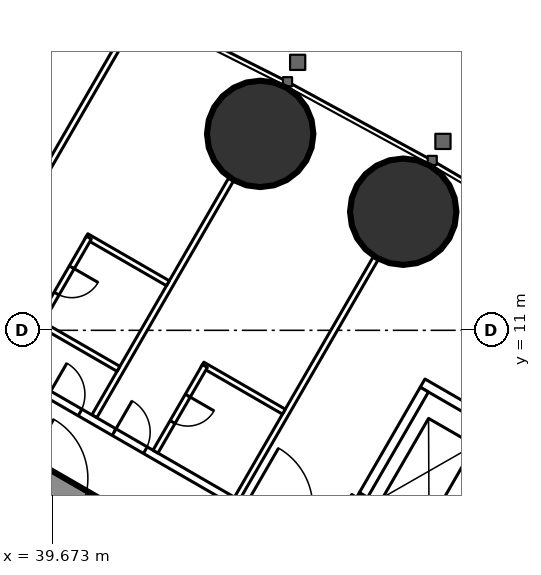
"""IFC4 building model, lengths in metres.
Left out: names, types, materials, properties, quantities, classifications, styles, units other than length and angle.
Written with IfcOpenShell. Run it as: python <this file> out.ifc"""

import sys

from ifc_helpers import new_model, si_unit, direction, frame, frame_2d, origin, origin_2d, place, context, subcontext, project, spatial, rectangle, circle, extrude, element, fill, save


model = new_model("IFC4")
c1 = context("Model", 3, precision=1e-05, world=origin(), true_north=direction((0.0, 1.0)))
c2 = subcontext(c1, "Body", "Model", "MODEL_VIEW")
j1 = project(units=[si_unit("LENGTHUNIT", "METRE"), si_unit("PLANEANGLEUNIT", "RADIAN")], contexts=[c1])
p1 = place(None, origin())
s1 = spatial("IfcSite", under=j1, at=p1, CompositionType="ELEMENT")
p2 = place(p1, origin())
s2 = spatial("IfcBuilding", under=s1, at=p2, CompositionType="ELEMENT")
p3 = place(p2, frame((0.0, 0.0, 159.8)))
s3 = spatial("IfcBuildingStorey", under=s2, at=p3, CompositionType="ELEMENT", Elevation=159.8)
for number, where, z_axis, x_axis in (
    (1, (48.897, 14.121, 0.0), (0.0, 0.0, 1.0), (1.0, 0.0, 0.0)),
    (2, (45.134, 16.168, 0.0), (0.0, 0.0, 1.0), (1.0, 0.0, 0.0)),
):
    element("IfcColumn", number, at=place(p3, frame(where, z_axis=z_axis, x_axis=x_axis)), inside=s3, PredefinedType="COLUMN", context=c2, shape_type="SweptSolid", body=[
        extrude(circle(Radius=1.4, at=origin_2d()), origin(), (0.0, 0.0, 1.0), 3.5),
    ])
p4 = place(p3, frame((27.2, 13.8, 0.0), z_axis=(0.0, 0.0, 1.0), x_axis=(0.866024515034, -0.500001539357, 0.0)))
e3 = element("IfcWall", 3, at=p4, inside=s3, PredefinedType="SHEAR", context=c2, shape_type="SweptSolid", body=[
    extrude(rectangle(XDim=26.907, YDim=1.2, at=frame_2d((13.454, 0.0))), origin(), (0.0, 0.0, 1.0), 3.5),
])
p5 = place(p4, frame((4.6, 0.0, 0.0)))
e4 = element("IfcOpeningElement", 4, at=p5, cuts=e3, PredefinedType="OPENING", context=c2, shape_type="SweptSolid", body=[
    extrude(rectangle(XDim=1.0, YDim=2.2, at=frame_2d((0.5, 1.1))), frame((0.0, 0.61, 0.0), z_axis=(0.0, -1.0, 0.0), x_axis=(1.0, 0.0, 0.0)), (0.0, 0.0, 1.0), 1.22),
])
p6 = place(p4, frame((13.395, 0.0, 0.0)))
e5 = element("IfcOpeningElement", 5, at=p6, cuts=e3, PredefinedType="OPENING", context=c2, shape_type="SweptSolid", body=[
    extrude(rectangle(XDim=1.8, YDim=2.2, at=frame_2d((0.9, 1.1))), frame((0.0, 0.61, 0.0), z_axis=(0.0, -1.0, 0.0), x_axis=(1.0, 0.0, 0.0)), (0.0, 0.0, 1.0), 1.22),
])
p7 = place(p3, frame((37.022, 10.9, 0.0), z_axis=(0.0, 0.0, 1.0), x_axis=(0.499998620953, 0.866026199976, 0.0)))
e6 = element("IfcWall", 6, at=p7, inside=s3, PredefinedType="PARTITIONING", context=c2, shape_type="SweptSolid", body=[
    extrude(rectangle(XDim=9.77, YDim=0.15, at=frame_2d((4.885, 0.0))), origin(), (0.0, 0.0, 1.0), 3.25),
])
p8 = place(p3, frame((40.769, 8.737, 0.0), z_axis=(0.0, 0.0, 1.0), x_axis=(0.500013115284, 0.866017831539, 0.0)))
e7 = element("IfcWall", 7, at=p8, inside=s3, PredefinedType="PARTITIONING", context=c2, shape_type="SweptSolid", body=[
    extrude(rectangle(XDim=7.198, YDim=0.15, at=frame_2d((3.599, 0.0))), origin(), (0.0, 0.0, 1.0), 2.3),
])
p9 = place(p3, frame((44.521, 6.571, 0.0), z_axis=(0.0, 0.0, 1.0), x_axis=(0.500020376429, 0.866013639128, 0.0)))
e8 = element("IfcWall", 8, at=p9, inside=s3, PredefinedType="PARTITIONING", context=c2, shape_type="SweptSolid", body=[
    extrude(rectangle(XDim=7.306, YDim=0.15, at=frame_2d((3.653, 0.0))), origin(), (0.0, 0.0, 1.0), 2.3),
])
p10 = place(p3, frame((36.834, 10.894, 0.0), z_axis=(0.0, 0.0, 1.0), x_axis=(0.866031655879, -0.499989170898, 0.0)))
e9 = element("IfcWall", 9, at=p10, inside=s3, PredefinedType="PARTITIONING", context=c2, shape_type="SweptSolid", body=[
    extrude(rectangle(XDim=11.41, YDim=0.2, at=frame_2d((5.705, 0.0))), origin(), (0.0, 0.0, 1.0), 3.25),
])
p11 = place(p10, frame((5.144, 0.0, 0.0)))
e10 = element("IfcOpeningElement", 10, at=p11, cuts=e9, PredefinedType="OPENING", context=c2, shape_type="SweptSolid", body=[
    extrude(rectangle(XDim=0.95, YDim=2.2, at=frame_2d((0.475, 1.1))), frame((0.0, 0.11, 0.0), z_axis=(0.0, -1.0, 0.0), x_axis=(1.0, 0.0, 0.0)), (0.0, 0.0, 1.0), 0.22),
])
p12 = place(p10, frame((3.161, 0.0, 0.0)))
e11 = element("IfcOpeningElement", 11, at=p12, cuts=e9, PredefinedType="OPENING", context=c2, shape_type="SweptSolid", body=[
    extrude(rectangle(XDim=0.95, YDim=2.2, at=frame_2d((0.475, 1.1))), frame((0.0, 0.11, 0.0), z_axis=(0.0, -1.0, 0.0), x_axis=(1.0, 0.0, 0.0)), (0.0, 0.0, 1.0), 0.22),
])
p13 = place(p10, frame((9.102, 0.0, 0.0)))
e12 = element("IfcOpeningElement", 12, at=p13, cuts=e9, PredefinedType="OPENING", context=c2, shape_type="SweptSolid", body=[
    extrude(rectangle(XDim=1.8, YDim=2.2, at=frame_2d((0.9, 1.1))), frame((0.0, 0.11, 0.0), z_axis=(0.0, -1.0, 0.0), x_axis=(1.0, 0.0, 0.0)), (0.0, 0.0, 1.0), 0.22),
])
p14 = place(p3, frame((47.606, 6.643, 0.0), z_axis=(0.0, 0.0, 1.0), x_axis=(-0.514237157483, -0.857648031458, 0.0)))
e13 = element("IfcWall", 13, at=p14, inside=s3, PredefinedType="PARTITIONING", context=c2, shape_type="SweptSolid", body=[
    extrude(rectangle(XDim=1.805, YDim=0.15, at=frame_2d((0.902, 0.0))), origin(), (0.0, 0.0, 1.0), 3.25),
])
p15 = place(p3, frame((43.613, 10.097, 0.0), z_axis=(0.0, 0.0, 1.0), x_axis=(0.866031185235, -0.4999899861, 0.0)))
e14 = element("IfcWall", 14, at=p15, inside=s3, PredefinedType="PARTITIONING", context=c2, shape_type="SweptSolid", body=[
    extrude(rectangle(XDim=2.475, YDim=0.15, at=frame_2d((1.238, 0.0))), origin(), (0.0, 0.0, 1.0), 3.25),
])
p16 = place(p3, frame((42.378, 7.808, 0.0), z_axis=(0.0, 0.0, 1.0), x_axis=(0.500006934395, 0.866021400173, 0.0)))
e15 = element("IfcWall", 15, at=p16, inside=s3, PredefinedType="PARTITIONING", context=c2, shape_type="SweptSolid", body=[
    extrude(rectangle(XDim=2.6, YDim=0.15, at=frame_2d((1.3, 0.0))), origin(), (0.0, 0.0, 1.0), 3.25),
])
p17 = place(p16, frame((0.9, 0.0, 0.0)))
e16 = element("IfcOpeningElement", 16, at=p17, cuts=e15, PredefinedType="OPENING", context=c2, shape_type="SweptSolid", body=[
    extrude(rectangle(XDim=0.8, YDim=2.2, at=frame_2d((0.4, 1.1))), frame((0.0, 0.085, 0.0), z_axis=(0.0, -1.0, 0.0), x_axis=(1.0, 0.0, 0.0)), (0.0, 0.0, 1.0), 0.17),
])
p18 = place(p3, frame((40.561, 13.476, 0.0), z_axis=(0.0, 0.0, 1.0), x_axis=(0.866006523861, -0.500032699561, 0.0)))
e17 = element("IfcWall", 17, at=p18, inside=s3, PredefinedType="PARTITIONING", context=c2, shape_type="SweptSolid", body=[
    extrude(rectangle(XDim=2.475, YDim=0.15, at=frame_2d((1.237, 0.0))), origin(), (0.0, 0.0, 1.0), 3.25),
])
p19 = place(p3, frame((39.326, 11.187, 0.0), z_axis=(0.0, 0.0, 1.0), x_axis=(0.500047596559, 0.865997922154, 0.0)))
e18 = element("IfcWall", 18, at=p19, inside=s3, PredefinedType="PARTITIONING", context=c2, shape_type="SweptSolid", body=[
    extrude(rectangle(XDim=2.6, YDim=0.15, at=frame_2d((1.3, 0.0))), origin(), (0.0, 0.0, 1.0), 3.25),
])
p20 = place(p19, frame((0.9, 0.0, 0.0)))
e19 = element("IfcOpeningElement", 19, at=p20, cuts=e18, PredefinedType="OPENING", context=c2, shape_type="SweptSolid", body=[
    extrude(rectangle(XDim=0.8, YDim=2.2, at=frame_2d((0.4, 1.1))), frame((0.0, 0.085, 0.0), z_axis=(0.0, -1.0, 0.0), x_axis=(1.0, 0.0, 0.0)), (0.0, 0.0, 1.0), 0.17),
])
p21 = place(p3, frame((39.261, 11.224, 0.0), z_axis=(0.0, 0.0, 1.0), x_axis=(0.866006523861, -0.500032699561, 0.0)))
e20 = element("IfcWall", 20, at=p21, inside=s3, PredefinedType="PARTITIONING", context=c2, shape_type="SweptSolid", body=[
    extrude(rectangle(XDim=2.475, YDim=0.15, at=frame_2d((1.237, 0.0))), origin(), (0.0, 0.0, 1.0), 2.45),
])
p22 = place(p3, frame((47.681, 6.622, 0.0), z_axis=(0.0, 0.0, 1.0), x_axis=(0.86603344179, -0.499986077507, 0.0)))
e21 = element("IfcWall", 21, at=p22, inside=s3, PredefinedType="PARTITIONING", context=c2, shape_type="SweptSolid", body=[
    extrude(rectangle(XDim=6.6, YDim=0.25, at=frame_2d((3.3, 0.0))), origin(), (0.0, 0.0, 1.0), 3.25),
])
p23 = place(p22, frame((0.75, 0.0, 0.0)))
e22 = element("IfcOpeningElement", 22, at=p23, cuts=e21, PredefinedType="OPENING", context=c2, shape_type="SweptSolid", body=[
    extrude(rectangle(XDim=1.1, YDim=2.2, at=frame_2d((0.55, 1.1))), frame((0.0, 0.135, 0.0), z_axis=(0.0, -1.0, 0.0), x_axis=(1.0, 0.0, 0.0)), (0.0, 0.0, 1.0), 0.27),
])
p24 = place(p22, frame((2.75, 0.0, 0.0)))
e23 = element("IfcOpeningElement", 23, at=p24, cuts=e21, PredefinedType="OPENING", context=c2, shape_type="SweptSolid", body=[
    extrude(rectangle(XDim=1.1, YDim=2.2, at=frame_2d((0.55, 1.1))), frame((0.0, 0.135, 0.0), z_axis=(0.0, -1.0, 0.0), x_axis=(1.0, 0.0, 0.0)), (0.0, 0.0, 1.0), 0.27),
])
p25 = place(p22, frame((4.75, 0.0, 0.0)))
e24 = element("IfcOpeningElement", 24, at=p25, cuts=e21, PredefinedType="OPENING", context=c2, shape_type="SweptSolid", body=[
    extrude(rectangle(XDim=1.1, YDim=2.2, at=frame_2d((0.55, 1.1))), frame((0.0, 0.135, 0.0), z_axis=(0.0, -1.0, 0.0), x_axis=(1.0, 0.0, 0.0)), (0.0, 0.0, 1.0), 0.27),
])
p26 = place(p3, frame((49.406, 9.611, 0.0), z_axis=(0.0, 0.0, 1.0), x_axis=(0.86603344179, -0.499986077507, 0.0)))
e25 = element("IfcWall", 25, at=p26, inside=s3, PredefinedType="PARTITIONING", context=c2, shape_type="SweptSolid", body=[
    extrude(rectangle(XDim=6.6, YDim=0.25, at=frame_2d((3.3, 0.0))), origin(), (0.0, 0.0, 1.0), 3.25),
])
p27 = place(p3, frame((47.852, 6.668, 0.0), z_axis=(0.0, 0.0, 1.0), x_axis=(0.499929347863, 0.866066190972, 0.0)))
e26 = element("IfcWall", 26, at=p27, inside=s3, PredefinedType="PARTITIONING", context=c2, shape_type="SweptSolid", body=[
    extrude(rectangle(XDim=3.201, YDim=0.25, at=frame_2d((1.6, 0.0))), origin(), (0.0, 0.0, 1.0), 3.25),
])
p28 = place(p17, origin())
e27 = element("IfcDoor", 27, at=p28, inside=s3, OperationType="SINGLE_SWING_RIGHT", PredefinedType="DOOR", context=c2, shape_type="SweptSolid", body=[
    extrude(rectangle(XDim=0.8, YDim=2.2, at=frame_2d((0.4, 1.1))), frame((0.0, 0.025, 0.0), z_axis=(0.0, -1.0, 0.0), x_axis=(1.0, 0.0, 0.0)), (0.0, 0.0, 1.0), 0.05),
])
fill(e16, e27)
p29 = place(p11, origin())
e28 = element("IfcDoor", 28, at=p29, inside=s3, OperationType="SINGLE_SWING_LEFT", PredefinedType="DOOR", context=c2, shape_type="SweptSolid", body=[
    extrude(rectangle(XDim=0.95, YDim=2.2, at=frame_2d((0.475, 1.1))), frame((0.0, 0.025, 0.0), z_axis=(0.0, -1.0, 0.0), x_axis=(1.0, 0.0, 0.0)), (0.0, 0.0, 1.0), 0.05),
])
fill(e10, e28)
p30 = place(p20, origin())
e29 = element("IfcDoor", 29, at=p30, inside=s3, OperationType="SINGLE_SWING_RIGHT", PredefinedType="DOOR", context=c2, shape_type="SweptSolid", body=[
    extrude(rectangle(XDim=0.8, YDim=2.2, at=frame_2d((0.4, 1.1))), frame((0.0, 0.025, 0.0), z_axis=(0.0, -1.0, 0.0), x_axis=(1.0, 0.0, 0.0)), (0.0, 0.0, 1.0), 0.05),
])
fill(e19, e29)
p31 = place(p12, origin())
e30 = element("IfcDoor", 30, at=p31, inside=s3, OperationType="SINGLE_SWING_LEFT", PredefinedType="DOOR", context=c2, shape_type="SweptSolid", body=[
    extrude(rectangle(XDim=0.95, YDim=2.2, at=frame_2d((0.475, 1.1))), frame((0.0, 0.025, 0.0), z_axis=(0.0, -1.0, 0.0), x_axis=(1.0, 0.0, 0.0)), (0.0, 0.0, 1.0), 0.05),
])
fill(e11, e30)
p32 = place(p6, origin())
e31 = element("IfcDoor", 31, at=p32, inside=s3, OperationType="DOUBLE_DOOR_SINGLE_SWING", PredefinedType="DOOR", context=c2, shape_type="SweptSolid", body=[
    extrude(rectangle(XDim=1.8, YDim=2.2, at=frame_2d((0.9, 1.1))), frame((0.0, 0.025, 0.0), z_axis=(0.0, -1.0, 0.0), x_axis=(1.0, 0.0, 0.0)), (0.0, 0.0, 1.0), 0.05),
])
fill(e5, e31)
save(model, sys.argv[1])
